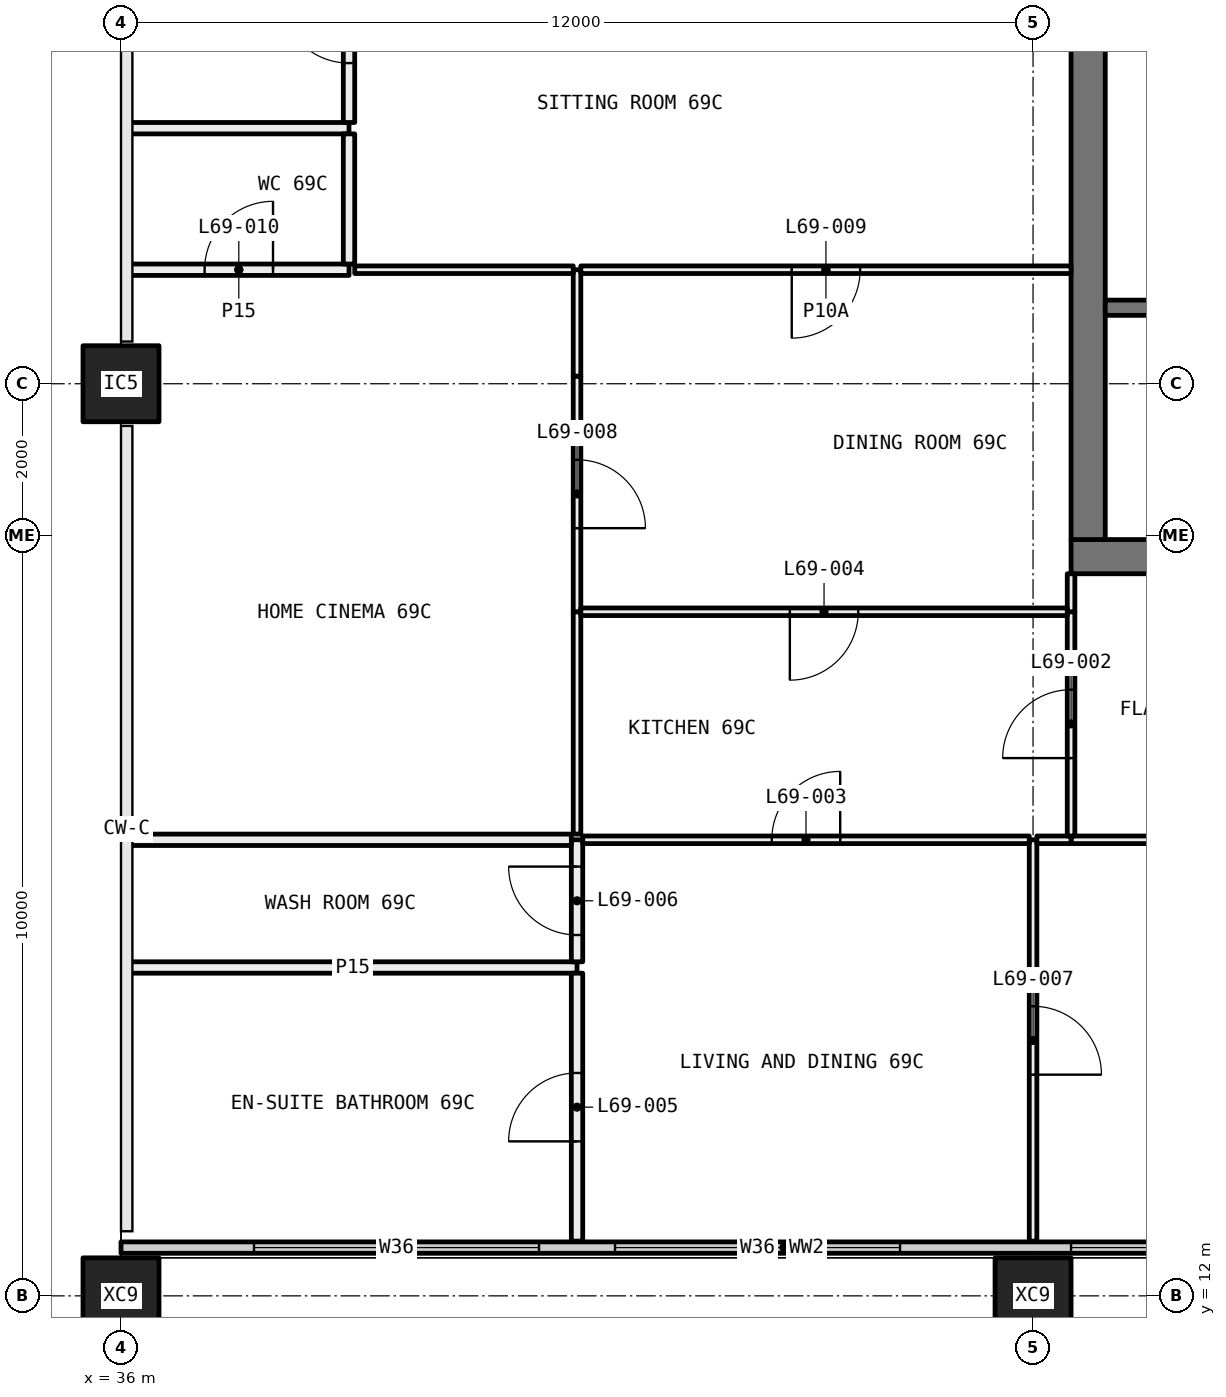
"""IFC4 building model, lengths in metres.
Left out: names, types, materials, properties, quantities, classifications, styles, units other than length and angle.
Written with IfcOpenShell. Run it as: python <this file> out.ifc"""

import sys

from ifc_helpers import new_model, si_unit, direction, frame, frame_2d, origin, origin_2d, place, context, subcontext, project, spatial, rectangle, hollow_rectangle, extrude, element, fill, save


model = new_model("IFC4")
c1 = context("Model", 3, precision=1e-05, world=origin(), true_north=direction((0.0, 1.0)))
c2 = subcontext(c1, "Body", "Model", "MODEL_VIEW")
j1 = project(units=[si_unit("LENGTHUNIT", "METRE"), si_unit("PLANEANGLEUNIT", "RADIAN")], contexts=[c1])
p1 = place(None, origin())
s1 = spatial("IfcSite", under=j1, at=p1, CompositionType="ELEMENT")
p2 = place(p1, origin())
s2 = spatial("IfcBuilding", under=s1, at=p2, CompositionType="ELEMENT")
p3 = place(p2, frame((0.0, 0.0, 255.9)))
s3 = spatial("IfcBuildingStorey", under=s2, at=p3, CompositionType="ELEMENT", Elevation=255.9)
p4 = place(p3, frame((36.0, 12.0, -0.4), z_axis=(0.0, 0.0, 1.0), x_axis=(1.0, 0.0, 0.0)))
e1 = element("IfcColumn", 1, at=p4, inside=s3, PredefinedType="COLUMN", context=c2, shape_type="SweptSolid", body=[
    extrude(hollow_rectangle(XDim=1.0, YDim=1.0, WallThickness=0.036, at=origin_2d()), origin(), (0.0, 0.0, 1.0), 3.45),
])
p5 = place(p3, frame((36.0, 24.0, 0.0), z_axis=(0.0, 0.0, 1.0), x_axis=(1.0, 0.0, 0.0)))
e2 = element("IfcColumn", 2, at=p5, inside=s3, PredefinedType="COLUMN", context=c2, shape_type="SweptSolid", body=[
    extrude(hollow_rectangle(XDim=1.0, YDim=1.0, WallThickness=0.04, at=origin_2d()), origin(), (0.0, 0.0, 1.0), 3.05),
])
p6 = place(p3, frame((48.0, 12.0, -0.4), z_axis=(0.0, 0.0, 1.0), x_axis=(1.0, 0.0, 0.0)))
e3 = element("IfcColumn", 3, at=p6, inside=s3, PredefinedType="COLUMN", context=c2, shape_type="SweptSolid", body=[
    extrude(hollow_rectangle(XDim=1.0, YDim=1.0, WallThickness=0.036, at=origin_2d()), origin(), (0.0, 0.0, 1.0), 3.45),
])
p7 = place(p3, frame((36.0, 12.635, 0.0), z_axis=(0.0, 0.0, 1.0), x_axis=(1.0, 0.0, 0.0)))
e4 = element("IfcWall", 4, at=p7, inside=s3, PredefinedType="ELEMENTEDWALL", context=c2, shape_type="SweptSolid", body=[
    extrude(rectangle(XDim=17.44, YDim=0.15, at=frame_2d((8.72, 0.0))), origin(), (0.0, 0.0, 1.0), 3.05),
])
p8 = place(p7, frame((1.75, 0.0, 0.45)))
e5 = element("IfcOpeningElement", 5, at=p8, cuts=e4, PredefinedType="OPENING", context=c2, shape_type="SweptSolid", body=[
    extrude(rectangle(XDim=3.75, YDim=2.55, at=frame_2d((1.875, 1.275))), frame((0.0, 0.085, 0.0), z_axis=(0.0, -1.0, 0.0), x_axis=(1.0, 0.0, 0.0)), (0.0, 0.0, 1.0), 0.17),
])
p9 = place(p7, frame((6.5, 0.0, 0.45)))
e6 = element("IfcOpeningElement", 6, at=p9, cuts=e4, PredefinedType="OPENING", context=c2, shape_type="SweptSolid", body=[
    extrude(rectangle(XDim=3.75, YDim=2.55, at=frame_2d((1.875, 1.275))), frame((0.0, 0.085, 0.0), z_axis=(0.0, -1.0, 0.0), x_axis=(1.0, 0.0, 0.0)), (0.0, 0.0, 1.0), 0.17),
])
p10 = place(p7, frame((12.5, 0.0, 0.45)))
e7 = element("IfcOpeningElement", 7, at=p10, cuts=e4, PredefinedType="OPENING", context=c2, shape_type="SweptSolid", body=[
    extrude(rectangle(XDim=4.5, YDim=2.55, at=frame_2d((2.25, 1.275))), frame((0.0, 0.085, 0.0), z_axis=(0.0, -1.0, 0.0), x_axis=(1.0, 0.0, 0.0)), (0.0, 0.0, 1.0), 0.17),
])
p11 = place(p3, frame((42.0, 16.32, 0.0), z_axis=(0.0, 0.0, 1.0), x_axis=(-1.0, 0.0, 0.0)))
e8 = element("IfcWall", 8, at=p11, inside=s3, PredefinedType="PARTITIONING", context=c2, shape_type="SweptSolid", body=[
    extrude(rectangle(XDim=5.9, YDim=0.15, at=frame_2d((2.95, 0.0))), origin(), (0.0, 0.0, 1.0), 3.05),
])
p12 = place(p3, frame((42.0, 12.72, 0.0), z_axis=(0.0, 0.0, 1.0), x_axis=(0.0, 1.0, 0.0)))
e9 = element("IfcWall", 9, at=p12, inside=s3, PredefinedType="PARTITIONING", context=c2, shape_type="SweptSolid", body=[
    extrude(rectangle(XDim=3.525, YDim=0.15, at=frame_2d((1.763, 0.0))), origin(), (0.0, 0.0, 1.0), 3.05),
])
p13 = place(p12, frame((1.312, 0.0, 0.0)))
e10 = element("IfcOpeningElement", 10, at=p13, cuts=e9, PredefinedType="OPENING", context=c2, shape_type="SweptSolid", body=[
    extrude(rectangle(XDim=0.9, YDim=2.1, at=frame_2d((0.45, 1.05))), frame((0.0, 0.085, 0.0), z_axis=(0.0, -1.0, 0.0), x_axis=(1.0, 0.0, 0.0)), (0.0, 0.0, 1.0), 0.17),
])
p14 = place(p3, frame((42.0, 16.395, 0.0), z_axis=(0.0, 0.0, 1.0), x_axis=(0.0, 1.0, 0.0)))
e11 = element("IfcWall", 11, at=p14, inside=s3, PredefinedType="PARTITIONING", context=c2, shape_type="SweptSolid", body=[
    extrude(rectangle(XDim=1.605, YDim=0.15, at=frame_2d((0.802, 0.0))), origin(), (0.0, 0.0, 1.0), 3.05),
])
p15 = place(p14, frame((0.353, 0.0, 0.0)))
e12 = element("IfcOpeningElement", 12, at=p15, cuts=e11, PredefinedType="OPENING", context=c2, shape_type="SweptSolid", body=[
    extrude(rectangle(XDim=0.9, YDim=2.1, at=frame_2d((0.45, 1.05))), frame((0.0, 0.085, 0.0), z_axis=(0.0, -1.0, 0.0), x_axis=(1.0, 0.0, 0.0)), (0.0, 0.0, 1.0), 0.17),
])
p16 = place(p3, frame((41.925, 18.0, 0.0), z_axis=(0.0, 0.0, 1.0), x_axis=(-1.0, 0.0, 0.0)))
e13 = element("IfcWall", 13, at=p16, inside=s3, PredefinedType="PARTITIONING", context=c2, shape_type="SweptSolid", body=[
    extrude(rectangle(XDim=5.825, YDim=0.15, at=frame_2d((2.913, 0.0))), origin(), (0.0, 0.0, 1.0), 3.05),
])
p17 = place(p3, frame((48.0, 12.72, 0.0), z_axis=(0.0, 0.0, 1.0), x_axis=(0.0, 1.0, 0.0)))
e14 = element("IfcWall", 14, at=p17, inside=s3, PredefinedType="PARTITIONING", context=c2, shape_type="SweptSolid", body=[
    extrude(rectangle(XDim=5.28, YDim=0.1, at=frame_2d((2.64, 0.0))), origin(), (0.0, 0.0, 1.0), 3.05),
])
p18 = place(p17, frame((2.19, 0.0, 0.0)))
e15 = element("IfcOpeningElement", 15, at=p18, cuts=e14, PredefinedType="OPENING", context=c2, shape_type="SweptSolid", body=[
    extrude(rectangle(XDim=0.9, YDim=2.1, at=frame_2d((0.45, 1.05))), frame((0.0, 0.06, 0.0), z_axis=(0.0, -1.0, 0.0), x_axis=(1.0, 0.0, 0.0)), (0.0, 0.0, 1.0), 0.12),
])
p19 = place(p3, frame((47.95, 18.0, 0.0), z_axis=(0.0, 0.0, 1.0), x_axis=(-1.0, 0.0, 0.0)))
e16 = element("IfcWall", 16, at=p19, inside=s3, PredefinedType="PARTITIONING", context=c2, shape_type="SweptSolid", body=[
    extrude(rectangle(XDim=5.875, YDim=0.1, at=frame_2d((2.938, 0.0))), origin(), (0.0, 0.0, 1.0), 3.05),
])
p20 = place(p19, frame((2.488, 0.0, 0.0)))
e17 = element("IfcOpeningElement", 17, at=p20, cuts=e16, PredefinedType="OPENING", context=c2, shape_type="SweptSolid", body=[
    extrude(rectangle(XDim=0.9, YDim=2.1, at=frame_2d((0.45, 1.05))), frame((0.0, 0.06, 0.0), z_axis=(0.0, -1.0, 0.0), x_axis=(1.0, 0.0, 0.0)), (0.0, 0.0, 1.0), 0.12),
])
p21 = place(p3, frame((53.28, 18.0, 0.0), z_axis=(0.0, 0.0, 1.0), x_axis=(-1.0, 0.0, 0.0)))
e18 = element("IfcWall", 18, at=p21, inside=s3, PredefinedType="PARTITIONING", context=c2, shape_type="SweptSolid", body=[
    extrude(rectangle(XDim=4.78, YDim=0.1, at=frame_2d((2.39, 0.0))), origin(), (0.0, 0.0, 1.0), 3.05),
])
p22 = place(p3, frame((48.5, 18.0, 0.0), z_axis=(0.0, 0.0, 1.0), x_axis=(-1.0, 0.0, 0.0)))
e19 = element("IfcWall", 19, at=p22, inside=s3, PredefinedType="PARTITIONING", context=c2, shape_type="SweptSolid", body=[
    extrude(rectangle(XDim=0.45, YDim=0.1, at=frame_2d((0.225, 0.0))), origin(), (0.0, 0.0, 1.0), 3.05),
])
p23 = place(p3, frame((48.5, 21.0, 0.0), z_axis=(0.0, 0.0, 1.0), x_axis=(0.0, -1.0, 0.0)))
e20 = element("IfcWall", 20, at=p23, inside=s3, PredefinedType="PARTITIONING", context=c2, shape_type="SweptSolid", body=[
    extrude(rectangle(XDim=2.95, YDim=0.1, at=frame_2d((1.475, 0.0))), origin(), (0.0, 0.0, 1.0), 3.05),
])
p24 = place(p23, frame((1.025, 0.0, 0.0)))
e21 = element("IfcOpeningElement", 21, at=p24, cuts=e20, PredefinedType="OPENING", context=c2, shape_type="SweptSolid", body=[
    extrude(rectangle(XDim=0.9, YDim=2.1, at=frame_2d((0.45, 1.05))), frame((0.0, 0.06, 0.0), z_axis=(0.0, -1.0, 0.0), x_axis=(1.0, 0.0, 0.0)), (0.0, 0.0, 1.0), 0.12),
])
p25 = place(p3, frame((48.5, 21.5, 0.0), z_axis=(0.0, 0.0, 1.0), x_axis=(0.0, -1.0, 0.0)))
e22 = element("IfcWall", 22, at=p25, inside=s3, PredefinedType="PARTITIONING", context=c2, shape_type="SweptSolid", body=[
    extrude(rectangle(XDim=0.5, YDim=0.1, at=frame_2d((0.25, 0.0))), origin(), (0.0, 0.0, 1.0), 3.05),
])
p26 = place(p3, frame((42.0, 18.075, 0.0), z_axis=(0.0, 0.0, 1.0), x_axis=(0.0, 1.0, 0.0)))
e23 = element("IfcWall", 23, at=p26, inside=s3, PredefinedType="PARTITIONING", context=c2, shape_type="SweptSolid", body=[
    extrude(rectangle(XDim=2.925, YDim=0.1, at=frame_2d((1.462, 0.0))), origin(), (0.0, 0.0, 1.0), 3.05),
])
p27 = place(p3, frame((42.0, 21.0, 0.0), z_axis=(0.0, 0.0, 1.0), x_axis=(0.0, 1.0, 0.0)))
e24 = element("IfcWall", 24, at=p27, inside=s3, PredefinedType="PARTITIONING", context=c2, shape_type="SweptSolid", body=[
    extrude(rectangle(XDim=3.1, YDim=0.1, at=frame_2d((1.55, 0.0))), origin(), (0.0, 0.0, 1.0), 2.45),
])
p28 = place(p27, frame((1.1, 0.0, 0.0)))
e25 = element("IfcOpeningElement", 25, at=p28, cuts=e24, PredefinedType="OPENING", context=c2, shape_type="SweptSolid", body=[
    extrude(rectangle(XDim=0.9, YDim=2.1, at=frame_2d((0.45, 1.05))), frame((0.0, 0.06, 0.0), z_axis=(0.0, -1.0, 0.0), x_axis=(1.0, 0.0, 0.0)), (0.0, 0.0, 1.0), 0.12),
])
p29 = place(p3, frame((42.0, 24.1, 0.0), z_axis=(0.0, 0.0, 1.0), x_axis=(0.0, 1.0, 0.0)))
e26 = element("IfcWall", 26, at=p29, inside=s3, PredefinedType="PARTITIONING", context=c2, shape_type="SweptSolid", body=[
    extrude(rectangle(XDim=1.4, YDim=0.1, at=frame_2d((0.7, 0.0))), origin(), (0.0, 0.0, 1.0), 3.05),
])
p30 = place(p3, frame((39.0, 25.5, 0.0), z_axis=(0.0, 0.0, 1.0), x_axis=(-1.0, 0.0, 0.0)))
e27 = element("IfcWall", 27, at=p30, inside=s3, PredefinedType="PARTITIONING", context=c2, shape_type="SweptSolid", body=[
    extrude(rectangle(XDim=2.9, YDim=0.15, at=frame_2d((1.45, 0.0))), origin(), (0.0, 0.0, 1.0), 3.05),
])
p31 = place(p30, frame((1.0, 0.0, 0.0)))
e28 = element("IfcOpeningElement", 28, at=p31, cuts=e27, PredefinedType="OPENING", context=c2, shape_type="SweptSolid", body=[
    extrude(rectangle(XDim=0.9, YDim=2.1, at=frame_2d((0.45, 1.05))), frame((0.0, 0.085, 0.0), z_axis=(0.0, -1.0, 0.0), x_axis=(1.0, 0.0, 0.0)), (0.0, 0.0, 1.0), 0.17),
])
p32 = place(p3, frame((41.95, 25.5, 0.0), z_axis=(0.0, 0.0, 1.0), x_axis=(-1.0, 0.0, 0.0)))
e29 = element("IfcWall", 29, at=p32, inside=s3, PredefinedType="PARTITIONING", context=c2, shape_type="SweptSolid", body=[
    extrude(rectangle(XDim=2.875, YDim=0.1, at=frame_2d((1.438, 0.0))), origin(), (0.0, 0.0, 1.0), 3.05),
])
p33 = place(p3, frame((48.45, 21.0, 0.0), z_axis=(0.0, 0.0, 1.0), x_axis=(-1.0, 0.0, 0.0)))
e30 = element("IfcWall", 30, at=p33, inside=s3, PredefinedType="PARTITIONING", context=c2, shape_type="SweptSolid", body=[
    extrude(rectangle(XDim=6.4, YDim=0.1, at=frame_2d((3.2, 0.0))), origin(), (0.0, 0.0, 1.0), 3.05),
])
p34 = place(p33, frame((2.75, 0.0, 0.0)))
e31 = element("IfcOpeningElement", 31, at=p34, cuts=e30, PredefinedType="OPENING", context=c2, shape_type="SweptSolid", body=[
    extrude(rectangle(XDim=0.9, YDim=2.1, at=frame_2d((0.45, 1.05))), frame((0.0, 0.06, 0.0), z_axis=(0.0, -1.0, 0.0), x_axis=(1.0, 0.0, 0.0)), (0.0, 0.0, 1.0), 0.12),
])
p35 = place(p3, frame((48.5, 25.5, 0.0), z_axis=(0.0, 0.0, 1.0), x_axis=(-1.0, 0.0, 0.0)))
e32 = element("IfcWall", 32, at=p35, inside=s3, PredefinedType="PARTITIONING", context=c2, shape_type="SweptSolid", body=[
    extrude(rectangle(XDim=6.45, YDim=0.1, at=frame_2d((3.225, 0.0))), origin(), (0.0, 0.0, 1.0), 3.05),
])
p36 = place(p35, frame((2.775, 0.0, 0.0)))
e33 = element("IfcOpeningElement", 33, at=p36, cuts=e32, PredefinedType="OPENING", context=c2, shape_type="SweptSolid", body=[
    extrude(rectangle(XDim=0.9, YDim=2.1, at=frame_2d((0.45, 1.05))), frame((0.0, 0.06, 0.0), z_axis=(0.0, -1.0, 0.0), x_axis=(1.0, 0.0, 0.0)), (0.0, 0.0, 1.0), 0.12),
])
p37 = place(p3, frame((39.0, 27.362, 0.0), z_axis=(0.0, 0.0, 1.0), x_axis=(-1.0, 0.0, 0.0)))
e34 = element("IfcWall", 34, at=p37, inside=s3, PredefinedType="PARTITIONING", context=c2, shape_type="SweptSolid", body=[
    extrude(rectangle(XDim=2.9, YDim=0.15, at=frame_2d((1.45, 0.0))), origin(), (0.0, 0.0, 1.0), 3.05),
])
p38 = place(p3, frame((39.0, 25.575, 0.0), z_axis=(0.0, 0.0, 1.0), x_axis=(0.0, 1.0, 0.0)))
e35 = element("IfcWall", 35, at=p38, inside=s3, PredefinedType="PARTITIONING", context=c2, shape_type="SweptSolid", body=[
    extrude(rectangle(XDim=1.712, YDim=0.15, at=frame_2d((0.856, 0.0))), origin(), (0.0, 0.0, 1.0), 3.05),
])
p39 = place(p3, frame((39.0, 27.437, 0.0), z_axis=(0.0, 0.0, 1.0), x_axis=(0.0, 1.0, 0.0)))
e36 = element("IfcWall", 36, at=p39, inside=s3, PredefinedType="PARTITIONING", context=c2, shape_type="SweptSolid", body=[
    extrude(rectangle(XDim=2.463, YDim=0.15, at=frame_2d((1.231, 0.0))), origin(), (0.0, 0.0, 1.0), 3.05),
])
p40 = place(p39, frame((0.781, 0.0, 0.0)))
e37 = element("IfcOpeningElement", 37, at=p40, cuts=e36, PredefinedType="OPENING", context=c2, shape_type="SweptSolid", body=[
    extrude(rectangle(XDim=0.9, YDim=2.1, at=frame_2d((0.45, 1.05))), frame((0.0, 0.085, 0.0), z_axis=(0.0, -1.0, 0.0), x_axis=(1.0, 0.0, 0.0)), (0.0, 0.0, 1.0), 0.17),
])
p41 = place(p3, frame((59.5, 21.725, 0.0), z_axis=(0.0, 0.0, 1.0), x_axis=(-1.0, 0.0, 0.0)))
e38 = element("IfcWall", 38, at=p41, inside=s3, PredefinedType="SHEAR", context=c2, shape_type="SweptSolid", body=[
    extrude(rectangle(XDim=11.0, YDim=0.45, at=frame_2d((5.5, 0.0))), origin(), (0.0, 0.0, 1.0), 3.05),
])
p42 = place(p41, frame((1.125, 0.0, 0.0)))
e39 = element("IfcOpeningElement", 39, at=p42, cuts=e38, PredefinedType="OPENING", context=c2, shape_type="SweptSolid", body=[
    extrude(rectangle(XDim=1.0, YDim=2.1, at=frame_2d((0.5, 1.05))), frame((0.0, 0.235, 0.0), z_axis=(0.0, -1.0, 0.0), x_axis=(1.0, 0.0, 0.0)), (0.0, 0.0, 1.0), 0.47),
])
p43 = place(p3, frame((48.725, 21.95, 0.0), z_axis=(0.0, 0.0, 1.0), x_axis=(0.0, 1.0, 0.0)))
e40 = element("IfcWall", 40, at=p43, inside=s3, PredefinedType="SHEAR", context=c2, shape_type="SweptSolid", body=[
    extrude(rectangle(XDim=16.1, YDim=0.45, at=frame_2d((8.05, 0.0))), origin(), (0.0, 0.0, 1.0), 3.05),
])
p44 = place(p43, frame((7.25, 0.0, 0.0)))
e41 = element("IfcOpeningElement", 41, at=p44, cuts=e40, PredefinedType="OPENING", context=c2, shape_type="SweptSolid", body=[
    extrude(rectangle(XDim=1.6, YDim=2.1, at=frame_2d((0.8, 1.05))), frame((0.0, 0.235, 0.0), z_axis=(0.0, -1.0, 0.0), x_axis=(1.0, 0.0, 0.0)), (0.0, 0.0, 1.0), 0.47),
])
p45 = place(p3, frame((56.5, 25.0, 0.0), z_axis=(0.0, 0.0, 1.0), x_axis=(-1.0, 0.0, 0.0)))
e42 = element("IfcWall", 42, at=p45, inside=s3, PredefinedType="SOLIDWALL", context=c2, shape_type="SweptSolid", body=[
    extrude(rectangle(XDim=7.55, YDim=0.2, at=frame_2d((3.775, 0.0))), origin(), (0.0, 0.0, 1.0), 3.05),
])
p46 = place(p8, origin())
e43 = element("IfcWindow", 43, at=p46, inside=s3, PartitioningType="SINGLE_PANEL", PredefinedType="WINDOW", context=c2, shape_type="SweptSolid", body=[
    extrude(rectangle(XDim=3.75, YDim=2.55, at=frame_2d((1.875, 1.275))), frame((0.0, 0.03, 0.0), z_axis=(0.0, -1.0, 0.0), x_axis=(1.0, 0.0, 0.0)), (0.0, 0.0, 1.0), 0.06),
])
fill(e5, e43)
p47 = place(p9, origin())
e44 = element("IfcWindow", 44, at=p47, inside=s3, PartitioningType="SINGLE_PANEL", PredefinedType="WINDOW", context=c2, shape_type="SweptSolid", body=[
    extrude(rectangle(XDim=3.75, YDim=2.55, at=frame_2d((1.875, 1.275))), frame((0.0, 0.03, 0.0), z_axis=(0.0, -1.0, 0.0), x_axis=(1.0, 0.0, 0.0)), (0.0, 0.0, 1.0), 0.06),
])
fill(e6, e44)
p48 = place(p10, origin())
e45 = element("IfcWindow", 45, at=p48, inside=s3, PartitioningType="SINGLE_PANEL", PredefinedType="WINDOW", context=c2, shape_type="SweptSolid", body=[
    extrude(rectangle(XDim=4.5, YDim=2.55, at=frame_2d((2.25, 1.275))), frame((0.0, 0.03, 0.0), z_axis=(0.0, -1.0, 0.0), x_axis=(1.0, 0.0, 0.0)), (0.0, 0.0, 1.0), 0.06),
])
fill(e7, e45)
p49 = place(p24, frame((0.9, 0.0, 0.0), x_axis=(-1.0, 0.0, 0.0)))
e46 = element("IfcDoor", 46, at=p49, inside=s3, OperationType="SINGLE_SWING_RIGHT", PredefinedType="DOOR", context=c2, shape_type="SweptSolid", body=[
    extrude(rectangle(XDim=0.9, YDim=2.1, at=frame_2d((0.45, 1.05))), frame((0.0, 0.025, 0.0), z_axis=(0.0, -1.0, 0.0), x_axis=(1.0, 0.0, 0.0)), (0.0, 0.0, 1.0), 0.05),
])
fill(e21, e46)
p50 = place(p20, frame((0.9, 0.0, 0.0), x_axis=(-1.0, 0.0, 0.0)))
e47 = element("IfcDoor", 47, at=p50, inside=s3, OperationType="SINGLE_SWING_LEFT", PredefinedType="DOOR", context=c2, shape_type="SweptSolid", body=[
    extrude(rectangle(XDim=0.9, YDim=2.1, at=frame_2d((0.45, 1.05))), frame((0.0, 0.025, 0.0), z_axis=(0.0, -1.0, 0.0), x_axis=(1.0, 0.0, 0.0)), (0.0, 0.0, 1.0), 0.05),
])
fill(e17, e47)
p51 = place(p34, origin())
e48 = element("IfcDoor", 48, at=p51, inside=s3, OperationType="SINGLE_SWING_LEFT", PredefinedType="DOOR", context=c2, shape_type="SweptSolid", body=[
    extrude(rectangle(XDim=0.9, YDim=2.1, at=frame_2d((0.45, 1.05))), frame((0.0, 0.025, 0.0), z_axis=(0.0, -1.0, 0.0), x_axis=(1.0, 0.0, 0.0)), (0.0, 0.0, 1.0), 0.05),
])
fill(e31, e48)
p52 = place(p13, origin())
e49 = element("IfcDoor", 49, at=p52, inside=s3, OperationType="SINGLE_SWING_RIGHT", PredefinedType="DOOR", context=c2, shape_type="SweptSolid", body=[
    extrude(rectangle(XDim=0.9, YDim=2.1, at=frame_2d((0.45, 1.05))), frame((0.0, 0.025, 0.0), z_axis=(0.0, -1.0, 0.0), x_axis=(1.0, 0.0, 0.0)), (0.0, 0.0, 1.0), 0.05),
])
fill(e10, e49)
p53 = place(p15, origin())
e50 = element("IfcDoor", 50, at=p53, inside=s3, OperationType="SINGLE_SWING_LEFT", PredefinedType="DOOR", context=c2, shape_type="SweptSolid", body=[
    extrude(rectangle(XDim=0.9, YDim=2.1, at=frame_2d((0.45, 1.05))), frame((0.0, 0.025, 0.0), z_axis=(0.0, -1.0, 0.0), x_axis=(1.0, 0.0, 0.0)), (0.0, 0.0, 1.0), 0.05),
])
fill(e12, e50)
p54 = place(p18, frame((0.9, 0.0, 0.0), x_axis=(-1.0, 0.0, 0.0)))
e51 = element("IfcDoor", 51, at=p54, inside=s3, OperationType="SINGLE_SWING_LEFT", PredefinedType="DOOR", context=c2, shape_type="SweptSolid", body=[
    extrude(rectangle(XDim=0.9, YDim=2.1, at=frame_2d((0.45, 1.05))), frame((0.0, 0.025, 0.0), z_axis=(0.0, -1.0, 0.0), x_axis=(1.0, 0.0, 0.0)), (0.0, 0.0, 1.0), 0.05),
])
fill(e15, e51)
p55 = place(p28, frame((0.9, 0.0, 0.0), x_axis=(-1.0, 0.0, 0.0)))
e52 = element("IfcDoor", 52, at=p55, inside=s3, OperationType="SINGLE_SWING_LEFT", PredefinedType="DOOR", context=c2, shape_type="SweptSolid", body=[
    extrude(rectangle(XDim=0.9, YDim=2.1, at=frame_2d((0.45, 1.05))), frame((0.0, 0.025, 0.0), z_axis=(0.0, -1.0, 0.0), x_axis=(1.0, 0.0, 0.0)), (0.0, 0.0, 1.0), 0.05),
])
fill(e25, e52)
p56 = place(p36, origin())
e53 = element("IfcDoor", 53, at=p56, inside=s3, OperationType="SINGLE_SWING_LEFT", PredefinedType="DOOR", context=c2, shape_type="SweptSolid", body=[
    extrude(rectangle(XDim=0.9, YDim=2.1, at=frame_2d((0.45, 1.05))), frame((0.0, 0.025, 0.0), z_axis=(0.0, -1.0, 0.0), x_axis=(1.0, 0.0, 0.0)), (0.0, 0.0, 1.0), 0.05),
])
fill(e33, e53)
p57 = place(p31, frame((0.9, 0.0, 0.0), x_axis=(-1.0, 0.0, 0.0)))
e54 = element("IfcDoor", 54, at=p57, inside=s3, OperationType="SINGLE_SWING_LEFT", PredefinedType="DOOR", context=c2, shape_type="SweptSolid", body=[
    extrude(rectangle(XDim=0.9, YDim=2.1, at=frame_2d((0.45, 1.05))), frame((0.0, 0.025, 0.0), z_axis=(0.0, -1.0, 0.0), x_axis=(1.0, 0.0, 0.0)), (0.0, 0.0, 1.0), 0.05),
])
fill(e28, e54)
p58 = place(p40, origin())
e55 = element("IfcDoor", 55, at=p58, inside=s3, OperationType="SINGLE_SWING_LEFT", PredefinedType="DOOR", context=c2, shape_type="SweptSolid", body=[
    extrude(rectangle(XDim=0.9, YDim=2.1, at=frame_2d((0.45, 1.05))), frame((0.0, 0.025, 0.0), z_axis=(0.0, -1.0, 0.0), x_axis=(1.0, 0.0, 0.0)), (0.0, 0.0, 1.0), 0.05),
])
fill(e37, e55)
save(model, sys.argv[1])
